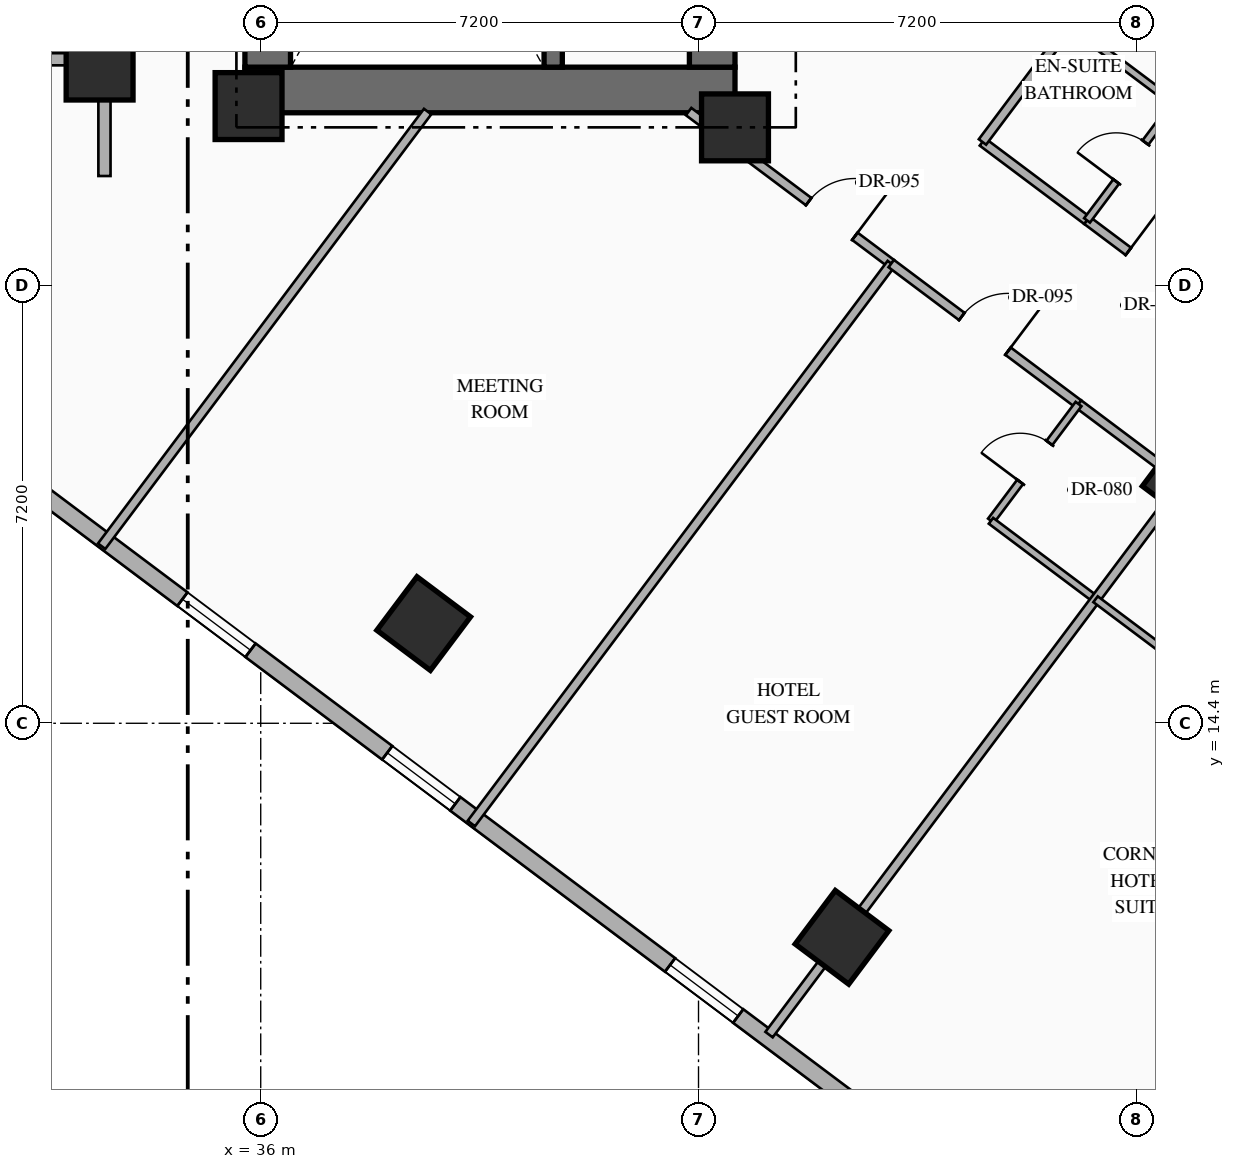
"""IFC4 building model, lengths in metres.
Left out: names, types, materials, properties, quantities, classifications, styles, units other than length and angle.
Written with IfcOpenShell. Run it as: python <this file> out.ifc"""

import sys

from ifc_helpers import new_model, si_unit, direction, frame, frame_2d, origin, origin_2d, place, context, subcontext, project, spatial, rectangle, hollow_rectangle, extrude, element, fill, save


model = new_model("IFC4")
c1 = context("Model", 3, precision=1e-05, world=origin(), true_north=direction((0.0, 1.0)))
c2 = subcontext(c1, "Body", "Model", "MODEL_VIEW")
j1 = project(units=[si_unit("LENGTHUNIT", "METRE"), si_unit("PLANEANGLEUNIT", "RADIAN")], contexts=[c1])
p1 = place(None, origin())
s1 = spatial("IfcSite", under=j1, at=p1, CompositionType="ELEMENT")
p2 = place(p1, origin())
s2 = spatial("IfcBuilding", under=s1, at=p2, CompositionType="ELEMENT")
p3 = place(p2, frame((0.0, 0.0, 36.6)))
s3 = spatial("IfcBuildingStorey", under=s2, at=p3, CompositionType="ELEMENT", Elevation=36.6)
p4 = place(p3, frame((35.74, 24.815, 0.0), z_axis=(0.0, 0.0, 1.0), x_axis=(1.0, 0.0, 0.0)))
e1 = element("IfcWall", 1, at=p4, inside=s3, PredefinedType="SHEAR", context=c2, shape_type="SweptSolid", body=[
    extrude(rectangle(XDim=8.06, YDim=0.75, at=frame_2d((4.03, 0.0))), origin(), (0.0, 0.0, 1.0), 3.35),
])
p5 = place(p3, frame((36.115, 25.19, 0.0), z_axis=(0.0, 0.0, 1.0), x_axis=(0.0, 1.0, 0.0)))
e2 = element("IfcWall", 2, at=p5, inside=s3, PredefinedType="SHEAR", context=c2, shape_type="SweptSolid", body=[
    extrude(rectangle(XDim=9.48, YDim=0.75, at=frame_2d((4.74, 0.0))), origin(), (0.0, 0.0, 1.0), 3.35),
])
p6 = place(p3, frame((43.425, 25.19, 0.0), z_axis=(0.0, 0.0, 1.0), x_axis=(0.0, 1.0, 0.0)))
e3 = element("IfcWall", 3, at=p6, inside=s3, PredefinedType="SHEAR", context=c2, shape_type="SweptSolid", body=[
    extrude(rectangle(XDim=9.48, YDim=0.75, at=frame_2d((4.74, 0.0))), origin(), (0.0, 0.0, 1.0), 3.35),
])
p7 = place(p6, frame((1.21, 0.0, 0.0)))
e4 = element("IfcOpeningElement", 4, at=p7, cuts=e3, PredefinedType="OPENING", context=c2, shape_type="SweptSolid", body=[
    extrude(rectangle(XDim=0.85, YDim=2.08, at=frame_2d((0.425, 1.04))), frame((0.0, 0.385, 0.0), z_axis=(0.0, -1.0, 0.0), x_axis=(1.0, 0.0, 0.0)), (0.0, 0.0, 1.0), 0.77),
])
p8 = place(p6, frame((4.46, 0.0, 0.0)))
e5 = element("IfcOpeningElement", 5, at=p8, cuts=e3, PredefinedType="OPENING", context=c2, shape_type="SweptSolid", body=[
    extrude(rectangle(XDim=0.85, YDim=2.08, at=frame_2d((0.425, 1.04))), frame((0.0, 0.385, 0.0), z_axis=(0.0, -1.0, 0.0), x_axis=(1.0, 0.0, 0.0)), (0.0, 0.0, 1.0), 0.77),
])
p9 = place(p3, frame((40.81, 25.19, 0.0), z_axis=(0.0, 0.0, 1.0), x_axis=(0.0, 1.0, 0.0)))
e6 = element("IfcWall", 6, at=p9, inside=s3, PredefinedType="SHEAR", context=c2, shape_type="SweptSolid", body=[
    extrude(rectangle(XDim=9.48, YDim=0.3, at=frame_2d((4.74, 0.0))), origin(), (0.0, 0.0, 1.0), 3.35),
])
for number, where, z_axis, x_axis in (
    (7, (35.8, 24.55, 0.0), (0.0, 0.0, 1.0), (1.0, 0.0, 0.0)),
    (8, (43.8, 24.2, 0.0), (0.0, 0.0, 1.0), (1.0, 0.0, 0.0)),
):
    element("IfcColumn", number, at=place(p3, frame(where, z_axis=z_axis, x_axis=x_axis)), inside=s3, PredefinedType="COLUMN", context=c2, shape_type="SweptSolid", body=[
        extrude(rectangle(XDim=1.1, YDim=1.1, at=origin_2d()), origin(), (0.0, 0.0, 1.0), 3.35),
    ])
for number, where, z_axis, x_axis in (
    (9, (33.35, 25.2, 0.0), (0.0, 0.0, 1.0), (1.0, 0.0, 0.0)),
    (10, (38.68, 16.04, 0.0), (0.0, 0.0, 1.0), (0.8, -0.6, 0.0)),
    (11, (45.56, 10.88, 0.0), (0.0, 0.0, 1.0), (0.8, -0.6, 0.0)),
):
    element("IfcColumn", number, at=place(p3, frame(where, z_axis=z_axis, x_axis=x_axis)), inside=s3, PredefinedType="COLUMN", context=c2, shape_type="SweptSolid", body=[
        extrude(hollow_rectangle(XDim=1.1, YDim=1.1, WallThickness=0.04, at=origin_2d()), origin(), (0.0, 0.0, 1.0), 3.35),
    ])
p10 = place(p3, frame((51.2, 18.4, 0.0), z_axis=(0.0, 0.0, 1.0), x_axis=(0.799999996291, -0.600000004945, 0.0)))
e12 = element("IfcColumn", 12, at=p10, inside=s3, PredefinedType="COLUMN", context=c2, shape_type="SweptSolid", body=[
    extrude(hollow_rectangle(XDim=1.0, YDim=1.0, WallThickness=0.038, at=origin_2d()), origin(), (0.0, 0.0, 1.0), 3.35),
])
p11 = place(p3, frame((44.86, 40.73, 0.0), z_axis=(0.0, 0.0, 1.0), x_axis=(0.800006902154, -0.599990797017, 0.0)))
e13 = element("IfcWall", 13, at=p11, inside=s3, PredefinedType="STANDARD", context=c2, shape_type="SweptSolid", body=[
    extrude(rectangle(XDim=29.712, YDim=0.28, at=frame_2d((14.856, 0.0))), origin(), (0.0, 0.0, 1.0), 3.13),
])
p12 = place(p11, frame((14.249, 0.0, 0.0)))
e14 = element("IfcOpeningElement", 14, at=p12, cuts=e13, PredefinedType="OPENING", context=c2, shape_type="SweptSolid", body=[
    extrude(rectangle(XDim=1.1, YDim=2.2, at=frame_2d((0.55, 1.1))), frame((0.0, 0.15, 0.0), z_axis=(0.0, -1.0, 0.0), x_axis=(1.0, 0.0, 0.0)), (0.0, 0.0, 1.0), 0.3),
])
p13 = place(p11, frame((1.612, 0.0, 0.85)))
e15 = element("IfcOpeningElement", 15, at=p13, cuts=e13, PredefinedType="OPENING", context=c2, shape_type="SweptSolid", body=[
    extrude(rectangle(XDim=1.4, YDim=1.8, at=frame_2d((0.7, 0.9))), frame((0.0, 0.15, 0.0), z_axis=(0.0, -1.0, 0.0), x_axis=(1.0, 0.0, 0.0)), (0.0, 0.0, 1.0), 0.3),
])
p14 = place(p11, frame((5.667, 0.0, 0.85)))
e16 = element("IfcOpeningElement", 16, at=p14, cuts=e13, PredefinedType="OPENING", context=c2, shape_type="SweptSolid", body=[
    extrude(rectangle(XDim=1.4, YDim=1.8, at=frame_2d((0.7, 0.9))), frame((0.0, 0.15, 0.0), z_axis=(0.0, -1.0, 0.0), x_axis=(1.0, 0.0, 0.0)), (0.0, 0.0, 1.0), 0.3),
])
p15 = place(p11, frame((9.912, 0.0, 0.85)))
e17 = element("IfcOpeningElement", 17, at=p15, cuts=e13, PredefinedType="OPENING", context=c2, shape_type="SweptSolid", body=[
    extrude(rectangle(XDim=1.4, YDim=1.8, at=frame_2d((0.7, 0.9))), frame((0.0, 0.15, 0.0), z_axis=(0.0, -1.0, 0.0), x_axis=(1.0, 0.0, 0.0)), (0.0, 0.0, 1.0), 0.3),
])
p16 = place(p11, frame((19.528, 0.0, 0.85)))
e18 = element("IfcOpeningElement", 18, at=p16, cuts=e13, PredefinedType="OPENING", context=c2, shape_type="SweptSolid", body=[
    extrude(rectangle(XDim=1.4, YDim=1.8, at=frame_2d((0.7, 0.9))), frame((0.0, 0.15, 0.0), z_axis=(0.0, -1.0, 0.0), x_axis=(1.0, 0.0, 0.0)), (0.0, 0.0, 1.0), 0.3),
])
p17 = place(p11, frame((23.451, 0.0, 0.85)))
e19 = element("IfcOpeningElement", 19, at=p17, cuts=e13, PredefinedType="OPENING", context=c2, shape_type="SweptSolid", body=[
    extrude(rectangle(XDim=1.4, YDim=1.8, at=frame_2d((0.7, 0.9))), frame((0.0, 0.15, 0.0), z_axis=(0.0, -1.0, 0.0), x_axis=(1.0, 0.0, 0.0)), (0.0, 0.0, 1.0), 0.3),
])
p18 = place(p11, frame((27.852, 0.0, 0.85)))
e20 = element("IfcOpeningElement", 20, at=p18, cuts=e13, PredefinedType="OPENING", context=c2, shape_type="SweptSolid", body=[
    extrude(rectangle(XDim=1.4, YDim=1.8, at=frame_2d((0.7, 0.9))), frame((0.0, 0.15, 0.0), z_axis=(0.0, -1.0, 0.0), x_axis=(1.0, 0.0, 0.0)), (0.0, 0.0, 1.0), 0.3),
])
p19 = place(p3, frame((53.318, 2.487, 0.0), z_axis=(0.0, 0.0, 1.0), x_axis=(-0.800004174678, 0.599994433723, 0.0)))
e21 = element("IfcWall", 21, at=p19, inside=s3, PredefinedType="STANDARD", context=c2, shape_type="SweptSolid", body=[
    extrude(rectangle(XDim=35.089, YDim=0.28, at=frame_2d((17.544, 0.0))), origin(), (0.0, 0.0, 1.0), 3.13),
])
p20 = place(p19, frame((1.931, 0.0, 0.85)))
e22 = element("IfcOpeningElement", 22, at=p20, cuts=e21, PredefinedType="OPENING", context=c2, shape_type="SweptSolid", body=[
    extrude(rectangle(XDim=1.4, YDim=1.8, at=frame_2d((0.7, 0.9))), frame((0.0, 0.15, 0.0), z_axis=(0.0, -1.0, 0.0), x_axis=(1.0, 0.0, 0.0)), (0.0, 0.0, 1.0), 0.3),
])
p21 = place(p19, frame((6.819, 0.0, 0.85)))
e23 = element("IfcOpeningElement", 23, at=p21, cuts=e21, PredefinedType="OPENING", context=c2, shape_type="SweptSolid", body=[
    extrude(rectangle(XDim=1.4, YDim=1.8, at=frame_2d((0.7, 0.9))), frame((0.0, 0.15, 0.0), z_axis=(0.0, -1.0, 0.0), x_axis=(1.0, 0.0, 0.0)), (0.0, 0.0, 1.0), 0.3),
])
p22 = place(p19, frame((11.832, 0.0, 0.85)))
e24 = element("IfcOpeningElement", 24, at=p22, cuts=e21, PredefinedType="OPENING", context=c2, shape_type="SweptSolid", body=[
    extrude(rectangle(XDim=1.4, YDim=1.8, at=frame_2d((0.7, 0.9))), frame((0.0, 0.15, 0.0), z_axis=(0.0, -1.0, 0.0), x_axis=(1.0, 0.0, 0.0)), (0.0, 0.0, 1.0), 0.3),
])
p23 = place(p19, frame((17.647, 0.0, 0.85)))
e25 = element("IfcOpeningElement", 25, at=p23, cuts=e21, PredefinedType="OPENING", context=c2, shape_type="SweptSolid", body=[
    extrude(rectangle(XDim=1.4, YDim=1.8, at=frame_2d((0.7, 0.9))), frame((0.0, 0.15, 0.0), z_axis=(0.0, -1.0, 0.0), x_axis=(1.0, 0.0, 0.0)), (0.0, 0.0, 1.0), 0.3),
])
p24 = place(p19, frame((21.857, 0.0, 0.85)))
e26 = element("IfcOpeningElement", 26, at=p24, cuts=e21, PredefinedType="OPENING", context=c2, shape_type="SweptSolid", body=[
    extrude(rectangle(XDim=1.4, YDim=1.8, at=frame_2d((0.7, 0.9))), frame((0.0, 0.15, 0.0), z_axis=(0.0, -1.0, 0.0), x_axis=(1.0, 0.0, 0.0)), (0.0, 0.0, 1.0), 0.3),
])
p25 = place(p19, frame((26.87, 0.0, 0.85)))
e27 = element("IfcOpeningElement", 27, at=p25, cuts=e21, PredefinedType="OPENING", context=c2, shape_type="SweptSolid", body=[
    extrude(rectangle(XDim=1.4, YDim=1.8, at=frame_2d((0.7, 0.9))), frame((0.0, 0.15, 0.0), z_axis=(0.0, -1.0, 0.0), x_axis=(1.0, 0.0, 0.0)), (0.0, 0.0, 1.0), 0.3),
])
p26 = place(p19, frame((31.757, 0.0, 0.85)))
e28 = element("IfcOpeningElement", 28, at=p26, cuts=e21, PredefinedType="OPENING", context=c2, shape_type="SweptSolid", body=[
    extrude(rectangle(XDim=1.4, YDim=1.8, at=frame_2d((0.7, 0.9))), frame((0.0, 0.15, 0.0), z_axis=(0.0, -1.0, 0.0), x_axis=(1.0, 0.0, 0.0)), (0.0, 0.0, 1.0), 0.3),
])
p27 = place(p3, frame((33.43, 23.4, 0.0), z_axis=(0.0, 0.0, 1.0), x_axis=(0.0, 1.0, 0.0)))
e29 = element("IfcWall", 29, at=p27, inside=s3, PredefinedType="STANDARD", context=c2, shape_type="SweptSolid", body=[
    extrude(rectangle(XDim=4.08, YDim=0.2, at=frame_2d((2.04, 0.0))), origin(), (0.0, 0.0, 1.0), 2.425),
])
p28 = place(p3, frame((25.55, 25.32, 0.0), z_axis=(0.0, 0.0, 1.0), x_axis=(1.0, 0.0, 0.0)))
e30 = element("IfcWall", 30, at=p28, inside=s3, PredefinedType="STANDARD", context=c2, shape_type="SweptSolid", body=[
    extrude(rectangle(XDim=7.88, YDim=0.2, at=frame_2d((3.94, 0.0))), origin(), (0.0, 0.0, 1.0), 2.525),
])
p29 = place(p3, frame((43.037, 24.46, 0.0), z_axis=(0.0, 0.0, 1.0), x_axis=(0.799971872363, -0.600037501685, 0.0)))
e31 = element("IfcWall", 31, at=p29, inside=s3, PredefinedType="PARTITIONING", context=c2, shape_type="SweptSolid", body=[
    extrude(rectangle(XDim=4.167, YDim=0.15, at=frame_2d((2.083, 0.0))), origin(), (0.0, 0.0, 1.0), 2.425),
])
p30 = place(p29, frame((2.468, 0.0, 0.0)))
e32 = element("IfcOpeningElement", 32, at=p30, cuts=e31, PredefinedType="OPENING", context=c2, shape_type="SweptSolid", body=[
    extrude(rectangle(XDim=0.95, YDim=2.15, at=frame_2d((0.475, 1.075))), frame((0.0, 0.085, 0.0), z_axis=(0.0, -1.0, 0.0), x_axis=(1.0, 0.0, 0.0)), (0.0, 0.0, 1.0), 0.17),
])
p31 = place(p3, frame((33.384, 17.312, 0.0), z_axis=(0.0, 0.0, 1.0), x_axis=(0.600008743659, 0.799993442181, 0.0)))
e33 = element("IfcWall", 33, at=p31, inside=s3, PredefinedType="PARTITIONING", context=c2, shape_type="SweptSolid", body=[
    extrude(rectangle(XDim=8.935, YDim=0.15, at=frame_2d((4.468, 0.0))), origin(), (0.0, 0.0, 1.0), 3.13),
])
p32 = place(p3, frame((39.464, 12.752, 0.0), z_axis=(0.0, 0.0, 1.0), x_axis=(0.6, 0.8, 0.0)))
e34 = element("IfcWall", 34, at=p32, inside=s3, PredefinedType="PARTITIONING", context=c2, shape_type="SweptSolid", body=[
    extrude(rectangle(XDim=11.51, YDim=0.15, at=frame_2d((5.755, 0.0))), origin(), (0.0, 0.0, 1.0), 3.13),
])
p33 = place(p3, frame((47.87, 23.96, 0.0), z_axis=(0.0, 0.0, 1.0), x_axis=(0.79998637334, -0.60001816845, 0.0)))
e35 = element("IfcWall", 35, at=p33, inside=s3, PredefinedType="PARTITIONING", context=c2, shape_type="SweptSolid", body=[
    extrude(rectangle(XDim=2.15, YDim=0.15, at=frame_2d((1.075, 0.0))), origin(), (0.0, 0.0, 1.0), 2.775),
])
p34 = place(p3, frame((49.59, 22.67, 0.0), z_axis=(0.0, 0.0, 1.0), x_axis=(0.800011056104, -0.599985258246, 0.0)))
e36 = element("IfcWall", 36, at=p34, inside=s3, PredefinedType="PARTITIONING", context=c2, shape_type="SweptSolid", body=[
    extrude(rectangle(XDim=2.65, YDim=0.15, at=frame_2d((1.325, 0.0))), origin(), (0.0, 0.0, 1.0), 2.775),
])
p35 = place(p34, frame((0.85, 0.0, 0.0)))
e37 = element("IfcOpeningElement", 37, at=p35, cuts=e36, PredefinedType="OPENING", context=c2, shape_type="SweptSolid", body=[
    extrude(rectangle(XDim=0.95, YDim=2.15, at=frame_2d((0.475, 1.075))), frame((0.0, 0.085, 0.0), z_axis=(0.0, -1.0, 0.0), x_axis=(1.0, 0.0, 0.0)), (0.0, 0.0, 1.0), 0.17),
])
p36 = place(p3, frame((49.59, 22.67, 0.0), z_axis=(0.0, 0.0, 1.0), x_axis=(0.599951172744, 0.800036618114, 0.0)))
e38 = element("IfcWall", 38, at=p36, inside=s3, PredefinedType="PARTITIONING", context=c2, shape_type="SweptSolid", body=[
    extrude(rectangle(XDim=2.4, YDim=0.12, at=frame_2d((1.2, 0.0))), origin(), (0.0, 0.0, 1.0), 3.13),
])
p37 = place(p36, frame((0.8, 0.0, 0.0)))
e39 = element("IfcOpeningElement", 39, at=p37, cuts=e38, PredefinedType="OPENING", context=c2, shape_type="SweptSolid", body=[
    extrude(rectangle(XDim=0.8, YDim=2.06, at=frame_2d((0.4, 1.03))), frame((0.0, 0.07, 0.0), z_axis=(0.0, -1.0, 0.0), x_axis=(1.0, 0.0, 0.0)), (0.0, 0.0, 1.0), 0.14),
])
p38 = place(p3, frame((49.31, 25.88, 0.0), z_axis=(0.0, 0.0, 1.0), x_axis=(0.800040880289, -0.59994548908, 0.0)))
e40 = element("IfcWall", 40, at=p38, inside=s3, PredefinedType="PARTITIONING", context=c2, shape_type="SweptSolid", body=[
    extrude(rectangle(XDim=2.15, YDim=0.12, at=frame_2d((1.075, 0.0))), origin(), (0.0, 0.0, 1.0), 3.13),
])
p39 = place(p3, frame((47.87, 23.96, 0.0), z_axis=(0.0, 0.0, 1.0), x_axis=(0.599996617946, 0.80000253653, 0.0)))
e41 = element("IfcWall", 41, at=p39, inside=s3, PredefinedType="PARTITIONING", context=c2, shape_type="SweptSolid", body=[
    extrude(rectangle(XDim=11.55, YDim=0.15, at=frame_2d((5.775, 0.0))), origin(), (0.0, 0.0, 1.0), 3.13),
])
p40 = place(p3, frame((46.37, 21.96, 0.0), z_axis=(0.0, 0.0, 1.0), x_axis=(0.799977170108, -0.600030438649, 0.0)))
e42 = element("IfcWall", 42, at=p40, inside=s3, PredefinedType="PARTITIONING", context=c2, shape_type="SweptSolid", body=[
    extrude(rectangle(XDim=3.85, YDim=0.15, at=frame_2d((1.925, 0.0))), origin(), (0.0, 0.0, 1.0), 2.425),
])
p41 = place(p40, frame((1.45, 0.0, 0.0)))
e43 = element("IfcOpeningElement", 43, at=p41, cuts=e42, PredefinedType="OPENING", context=c2, shape_type="SweptSolid", body=[
    extrude(rectangle(XDim=0.95, YDim=2.15, at=frame_2d((0.475, 1.075))), frame((0.0, 0.085, 0.0), z_axis=(0.0, -1.0, 0.0), x_axis=(1.0, 0.0, 0.0)), (0.0, 0.0, 1.0), 0.17),
])
p42 = place(p3, frame((49.45, 19.65, 0.0), z_axis=(0.0, 0.0, 1.0), x_axis=(0.800040880289, -0.59994548908, 0.0)))
e44 = element("IfcWall", 44, at=p42, inside=s3, PredefinedType="PARTITIONING", context=c2, shape_type="SweptSolid", body=[
    extrude(rectangle(XDim=2.15, YDim=0.15, at=frame_2d((1.075, 0.0))), origin(), (0.0, 0.0, 1.0), 2.425),
])
p43 = place(p3, frame((48.01, 17.73, 0.0), z_axis=(0.0, 0.0, 1.0), x_axis=(0.6, 0.8, 0.0)))
e45 = element("IfcWall", 45, at=p43, inside=s3, PredefinedType="PARTITIONING", context=c2, shape_type="SweptSolid", body=[
    extrude(rectangle(XDim=2.4, YDim=0.12, at=frame_2d((1.2, 0.0))), origin(), (0.0, 0.0, 1.0), 3.13),
])
p44 = place(p43, frame((0.8, 0.0, 0.0)))
e46 = element("IfcOpeningElement", 46, at=p44, cuts=e45, PredefinedType="OPENING", context=c2, shape_type="SweptSolid", body=[
    extrude(rectangle(XDim=0.8, YDim=2.06, at=frame_2d((0.4, 1.03))), frame((0.0, 0.07, 0.0), z_axis=(0.0, -1.0, 0.0), x_axis=(1.0, 0.0, 0.0)), (0.0, 0.0, 1.0), 0.14),
])
p45 = place(p3, frame((48.01, 17.73, 0.0), z_axis=(0.0, 0.0, 1.0), x_axis=(0.79998637334, -0.60001816845, 0.0)))
e47 = element("IfcWall", 47, at=p45, inside=s3, PredefinedType="PARTITIONING", context=c2, shape_type="SweptSolid", body=[
    extrude(rectangle(XDim=2.15, YDim=0.12, at=frame_2d((1.075, 0.0))), origin(), (0.0, 0.0, 1.0), 3.13),
])
p46 = place(p3, frame((44.36, 9.28, 0.0), z_axis=(0.0, 0.0, 1.0), x_axis=(0.599986233332, 0.800010324816, 0.0)))
e48 = element("IfcWall", 48, at=p46, inside=s3, PredefinedType="PARTITIONING", context=c2, shape_type="SweptSolid", body=[
    extrude(rectangle(XDim=11.35, YDim=0.15, at=frame_2d((5.675, 0.0))), origin(), (0.0, 0.0, 1.0), 2.425),
])
p47 = place(p3, frame((49.73, 16.44, 0.0), z_axis=(0.0, 0.0, 1.0), x_axis=(0.79998637334, -0.60001816845, 0.0)))
e49 = element("IfcWall", 49, at=p47, inside=s3, PredefinedType="PARTITIONING", context=c2, shape_type="SweptSolid", body=[
    extrude(rectangle(XDim=2.15, YDim=0.12, at=frame_2d((1.075, 0.0))), origin(), (0.0, 0.0, 1.0), 3.13),
])
p48 = place(p3, frame((49.8, 5.2, 0.0), z_axis=(0.0, 0.0, 1.0), x_axis=(0.6, 0.8, 0.0)))
e50 = element("IfcWall", 50, at=p48, inside=s3, PredefinedType="PARTITIONING", context=c2, shape_type="SweptSolid", body=[
    extrude(rectangle(XDim=11.35, YDim=0.15, at=frame_2d((5.675, 0.0))), origin(), (0.0, 0.0, 1.0), 3.13),
])
p49 = place(p22, origin())
e51 = element("IfcWindow", 51, at=p49, inside=s3, PartitioningType="SINGLE_PANEL", PredefinedType="WINDOW", context=c2, shape_type="SweptSolid", body=[
    extrude(rectangle(XDim=1.4, YDim=1.8, at=frame_2d((0.7, 0.9))), frame((0.0, 0.03, 0.0), z_axis=(0.0, -1.0, 0.0), x_axis=(1.0, 0.0, 0.0)), (0.0, 0.0, 1.0), 0.06),
])
fill(e24, e51)
p50 = place(p23, origin())
e52 = element("IfcWindow", 52, at=p50, inside=s3, PartitioningType="SINGLE_PANEL", PredefinedType="WINDOW", context=c2, shape_type="SweptSolid", body=[
    extrude(rectangle(XDim=1.4, YDim=1.8, at=frame_2d((0.7, 0.9))), frame((0.0, 0.03, 0.0), z_axis=(0.0, -1.0, 0.0), x_axis=(1.0, 0.0, 0.0)), (0.0, 0.0, 1.0), 0.06),
])
fill(e25, e52)
p51 = place(p24, origin())
e53 = element("IfcWindow", 53, at=p51, inside=s3, PartitioningType="SINGLE_PANEL", PredefinedType="WINDOW", context=c2, shape_type="SweptSolid", body=[
    extrude(rectangle(XDim=1.4, YDim=1.8, at=frame_2d((0.7, 0.9))), frame((0.0, 0.03, 0.0), z_axis=(0.0, -1.0, 0.0), x_axis=(1.0, 0.0, 0.0)), (0.0, 0.0, 1.0), 0.06),
])
fill(e26, e53)
p52 = place(p30, origin())
e54 = element("IfcDoor", 54, at=p52, inside=s3, OperationType="SINGLE_SWING_RIGHT", PredefinedType="DOOR", context=c2, shape_type="SweptSolid", body=[
    extrude(rectangle(XDim=0.95, YDim=2.15, at=frame_2d((0.475, 1.075))), frame((0.0, 0.025, 0.0), z_axis=(0.0, -1.0, 0.0), x_axis=(1.0, 0.0, 0.0)), (0.0, 0.0, 1.0), 0.05),
])
fill(e32, e54)
p53 = place(p35, origin())
e55 = element("IfcDoor", 55, at=p53, inside=s3, OperationType="SINGLE_SWING_LEFT", PredefinedType="DOOR", context=c2, shape_type="SweptSolid", body=[
    extrude(rectangle(XDim=0.95, YDim=2.15, at=frame_2d((0.475, 1.075))), frame((0.0, 0.025, 0.0), z_axis=(0.0, -1.0, 0.0), x_axis=(1.0, 0.0, 0.0)), (0.0, 0.0, 1.0), 0.05),
])
fill(e37, e55)
p54 = place(p37, origin())
e56 = element("IfcDoor", 56, at=p54, inside=s3, OperationType="SINGLE_SWING_LEFT", PredefinedType="DOOR", context=c2, shape_type="SweptSolid", body=[
    extrude(rectangle(XDim=0.8, YDim=2.06, at=frame_2d((0.4, 1.03))), frame((0.0, 0.025, 0.0), z_axis=(0.0, -1.0, 0.0), x_axis=(1.0, 0.0, 0.0)), (0.0, 0.0, 1.0), 0.05),
])
fill(e39, e56)
p55 = place(p41, origin())
e57 = element("IfcDoor", 57, at=p55, inside=s3, OperationType="SINGLE_SWING_RIGHT", PredefinedType="DOOR", context=c2, shape_type="SweptSolid", body=[
    extrude(rectangle(XDim=0.95, YDim=2.15, at=frame_2d((0.475, 1.075))), frame((0.0, 0.025, 0.0), z_axis=(0.0, -1.0, 0.0), x_axis=(1.0, 0.0, 0.0)), (0.0, 0.0, 1.0), 0.05),
])
fill(e43, e57)
p56 = place(p44, origin())
e58 = element("IfcDoor", 58, at=p56, inside=s3, OperationType="SINGLE_SWING_LEFT", PredefinedType="DOOR", context=c2, shape_type="SweptSolid", body=[
    extrude(rectangle(XDim=0.8, YDim=2.06, at=frame_2d((0.4, 1.03))), frame((0.0, 0.025, 0.0), z_axis=(0.0, -1.0, 0.0), x_axis=(1.0, 0.0, 0.0)), (0.0, 0.0, 1.0), 0.05),
])
fill(e46, e58)
save(model, sys.argv[1])
